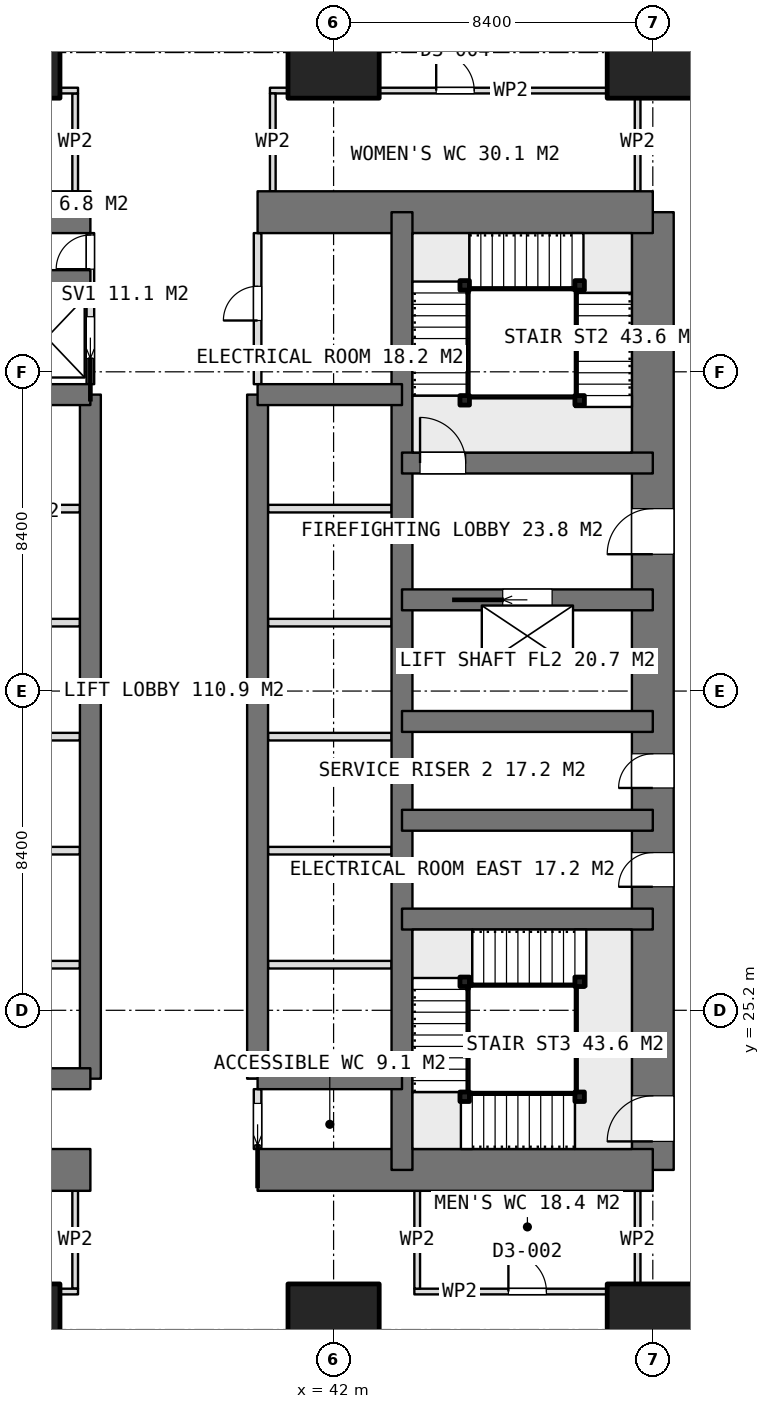
"""IFC4 building model, lengths in metres.
Left out: names, types, materials, properties, quantities, classifications, styles, units other than length and angle.
Written with IfcOpenShell. Run it as: python <this file> out.ifc"""

import sys

from ifc_helpers import new_model, si_unit, direction, frame, frame_2d, origin, origin_2d, place, context, subcontext, project, spatial, rectangle, extrude, element, fill, save


model = new_model("IFC4")
c1 = context("Model", 3, precision=1e-05, world=origin(), true_north=direction((0.0, 1.0)))
c2 = subcontext(c1, "Body", "Model", "MODEL_VIEW")
j1 = project(units=[si_unit("LENGTHUNIT", "METRE"), si_unit("PLANEANGLEUNIT", "RADIAN")], contexts=[c1])
p1 = place(None, origin())
s1 = spatial("IfcSite", under=j1, at=p1, CompositionType="ELEMENT")
p2 = place(p1, origin())
s2 = spatial("IfcBuilding", under=s1, at=p2, CompositionType="ELEMENT")
p3 = place(p2, frame((0.0, 0.0, -9.9)))
s3 = spatial("IfcBuildingStorey", under=s2, at=p3, CompositionType="ELEMENT", Elevation=-9.9)
p4 = place(p3, frame((25.2, 21.0, 0.0), z_axis=(0.0, 0.0, 1.0), x_axis=(1.0, 0.0, 0.0)))
e1 = element("IfcWall", 1, at=p4, inside=s3, PredefinedType="SHEAR", context=c2, shape_type="SweptSolid", body=[
    extrude(rectangle(XDim=10.4, YDim=1.1, at=frame_2d((5.2, 0.0))), origin(), (0.0, 0.0, 1.0), 4.5),
])
p5 = place(p3, frame((40.0, 21.0, 0.0), z_axis=(0.0, 0.0, 1.0), x_axis=(1.0, 0.0, 0.0)))
e2 = element("IfcWall", 2, at=p5, inside=s3, PredefinedType="SHEAR", context=c2, shape_type="SweptSolid", body=[
    extrude(rectangle(XDim=10.4, YDim=1.1, at=frame_2d((5.2, 0.0))), origin(), (0.0, 0.0, 1.0), 4.5),
])
p6 = place(p3, frame((25.2, 46.2, 0.0), z_axis=(0.0, 0.0, 1.0), x_axis=(1.0, 0.0, 0.0)))
e3 = element("IfcWall", 3, at=p6, inside=s3, PredefinedType="SHEAR", context=c2, shape_type="SweptSolid", body=[
    extrude(rectangle(XDim=10.4, YDim=1.1, at=frame_2d((5.2, 0.0))), origin(), (0.0, 0.0, 1.0), 4.5),
])
p7 = place(p3, frame((40.0, 46.2, 0.0), z_axis=(0.0, 0.0, 1.0), x_axis=(1.0, 0.0, 0.0)))
e4 = element("IfcWall", 4, at=p7, inside=s3, PredefinedType="SHEAR", context=c2, shape_type="SweptSolid", body=[
    extrude(rectangle(XDim=10.4, YDim=1.1, at=frame_2d((5.2, 0.0))), origin(), (0.0, 0.0, 1.0), 4.5),
])
p8 = place(p3, frame((50.4, 21.0, 0.0), z_axis=(0.0, 0.0, 1.0), x_axis=(0.0, 1.0, 0.0)))
e5 = element("IfcWall", 5, at=p8, inside=s3, PredefinedType="SHEAR", context=c2, shape_type="SweptSolid", body=[
    extrude(rectangle(XDim=25.2, YDim=1.1, at=frame_2d((12.6, 0.0))), origin(), (0.0, 0.0, 1.0), 4.5),
])
p9 = place(p8, frame((16.2, 0.0, 0.0)))
e6 = element("IfcOpeningElement", 6, at=p9, cuts=e5, PredefinedType="OPENING", context=c2, shape_type="SweptSolid", body=[
    extrude(rectangle(XDim=1.2, YDim=2.1, at=frame_2d((0.6, 1.05))), frame((0.0, 0.56, 0.0), z_axis=(0.0, -1.0, 0.0), x_axis=(1.0, 0.0, 0.0)), (0.0, 0.0, 1.0), 1.12),
])
p10 = place(p8, frame((10.05, 0.0, 0.0)))
e7 = element("IfcOpeningElement", 7, at=p10, cuts=e5, PredefinedType="OPENING", context=c2, shape_type="SweptSolid", body=[
    extrude(rectangle(XDim=0.9, YDim=2.1, at=frame_2d((0.45, 1.05))), frame((0.0, 0.56, 0.0), z_axis=(0.0, -1.0, 0.0), x_axis=(1.0, 0.0, 0.0)), (0.0, 0.0, 1.0), 1.12),
])
p11 = place(p8, frame((7.45, 0.0, 0.0)))
e8 = element("IfcOpeningElement", 8, at=p11, cuts=e5, PredefinedType="OPENING", context=c2, shape_type="SweptSolid", body=[
    extrude(rectangle(XDim=0.9, YDim=2.1, at=frame_2d((0.45, 1.05))), frame((0.0, 0.56, 0.0), z_axis=(0.0, -1.0, 0.0), x_axis=(1.0, 0.0, 0.0)), (0.0, 0.0, 1.0), 1.12),
])
p12 = place(p8, frame((0.75, 0.0, 0.0)))
e9 = element("IfcOpeningElement", 9, at=p12, cuts=e5, PredefinedType="OPENING", context=c2, shape_type="SweptSolid", body=[
    extrude(rectangle(XDim=1.2, YDim=2.1, at=frame_2d((0.6, 1.05))), frame((0.0, 0.56, 0.0), z_axis=(0.0, -1.0, 0.0), x_axis=(1.0, 0.0, 0.0)), (0.0, 0.0, 1.0), 1.12),
])
p13 = place(p3, frame((43.8, 21.0, 0.0), z_axis=(0.0, 0.0, 1.0), x_axis=(0.0, 1.0, 0.0)))
e10 = element("IfcWall", 10, at=p13, inside=s3, PredefinedType="SHEAR", context=c2, shape_type="SweptSolid", body=[
    extrude(rectangle(XDim=25.2, YDim=0.55, at=frame_2d((12.6, 0.0))), origin(), (0.0, 0.0, 1.0), 4.5),
])
for number, where, z_axis, x_axis in (
    (11, (35.6, 23.4, 0.0), (0.0, 0.0, 1.0), (0.0, 1.0, 0.0)),
    (12, (40.0, 23.4, 0.0), (0.0, 0.0, 1.0), (0.0, 1.0, 0.0)),
):
    element("IfcWall", number, at=place(p3, frame(where, z_axis=z_axis, x_axis=x_axis)), inside=s3, PredefinedType="SHEAR", context=c2, shape_type="SweptSolid", body=[
        extrude(rectangle(XDim=18.0, YDim=0.55, at=frame_2d((9.0, 0.0))), origin(), (0.0, 0.0, 1.0), 4.5),
    ])
for number, where, z_axis, x_axis in (
    (13, (31.8, 23.4, 0.0), (0.0, 0.0, 1.0), (1.0, 0.0, 0.0)),
    (14, (31.8, 41.4, 0.0), (0.0, 0.0, 1.0), (1.0, 0.0, 0.0)),
    (15, (31.8, 44.4, 0.0), (0.0, 0.0, 1.0), (1.0, 0.0, 0.0)),
    (16, (40.0, 23.4, 0.0), (0.0, 0.0, 1.0), (1.0, 0.0, 0.0)),
    (17, (40.0, 41.4, 0.0), (0.0, 0.0, 1.0), (1.0, 0.0, 0.0)),
):
    element("IfcWall", number, at=place(p3, frame(where, z_axis=z_axis, x_axis=x_axis)), inside=s3, PredefinedType="SHEAR", context=c2, shape_type="SweptSolid", body=[
        extrude(rectangle(XDim=3.8, YDim=0.55, at=frame_2d((1.9, 0.0))), origin(), (0.0, 0.0, 1.0), 4.5),
    ])
for number, where, z_axis, x_axis in (
    (18, (43.8, 27.6, 0.0), (0.0, 0.0, 1.0), (1.0, 0.0, 0.0)),
    (19, (43.8, 30.2, 0.0), (0.0, 0.0, 1.0), (1.0, 0.0, 0.0)),
    (20, (43.8, 32.8, 0.0), (0.0, 0.0, 1.0), (1.0, 0.0, 0.0)),
):
    element("IfcWall", number, at=place(p3, frame(where, z_axis=z_axis, x_axis=x_axis)), inside=s3, PredefinedType="SHEAR", context=c2, shape_type="SweptSolid", body=[
        extrude(rectangle(XDim=6.6, YDim=0.55, at=frame_2d((3.3, 0.0))), origin(), (0.0, 0.0, 1.0), 4.5),
    ])
p14 = place(p3, frame((43.8, 36.0, 0.0), z_axis=(0.0, 0.0, 1.0), x_axis=(1.0, 0.0, 0.0)))
e21 = element("IfcWall", 21, at=p14, inside=s3, PredefinedType="SHEAR", context=c2, shape_type="SweptSolid", body=[
    extrude(rectangle(XDim=6.6, YDim=0.55, at=frame_2d((3.3, 0.0))), origin(), (0.0, 0.0, 1.0), 4.5),
])
p15 = place(p14, frame((2.65, 0.0, 0.0)))
e22 = element("IfcOpeningElement", 22, at=p15, cuts=e21, PredefinedType="OPENING", context=c2, shape_type="SweptSolid", body=[
    extrude(rectangle(XDim=1.3, YDim=2.1, at=frame_2d((0.65, 1.05))), frame((0.0, 0.285, 0.0), z_axis=(0.0, -1.0, 0.0), x_axis=(1.0, 0.0, 0.0)), (0.0, 0.0, 1.0), 0.57),
])
p16 = place(p3, frame((43.8, 39.6, 0.0), z_axis=(0.0, 0.0, 1.0), x_axis=(1.0, 0.0, 0.0)))
e23 = element("IfcWall", 23, at=p16, inside=s3, PredefinedType="SHEAR", context=c2, shape_type="SweptSolid", body=[
    extrude(rectangle(XDim=6.6, YDim=0.55, at=frame_2d((3.3, 0.0))), origin(), (0.0, 0.0, 1.0), 4.5),
])
p17 = place(p16, frame((0.475, 0.0, 0.0)))
e24 = element("IfcOpeningElement", 24, at=p17, cuts=e23, PredefinedType="OPENING", context=c2, shape_type="SweptSolid", body=[
    extrude(rectangle(XDim=1.2, YDim=2.1, at=frame_2d((0.6, 1.05))), frame((0.0, 0.285, 0.0), z_axis=(0.0, -1.0, 0.0), x_axis=(1.0, 0.0, 0.0)), (0.0, 0.0, 1.0), 0.57),
])
for number, where, z_axis, x_axis in (
    (25, (33.6, 16.8, 0.0), (0.0, 0.0, 1.0), (1.0, 0.0, 0.0)),
    (26, (33.6, 50.4, 0.0), (0.0, 0.0, 1.0), (1.0, 0.0, 0.0)),
    (27, (42.0, 16.8, 0.0), (0.0, 0.0, 1.0), (1.0, 0.0, 0.0)),
    (28, (42.0, 50.4, 0.0), (0.0, 0.0, 1.0), (1.0, 0.0, 0.0)),
    (29, (50.4, 16.8, 0.0), (0.0, 0.0, 1.0), (1.0, 0.0, 0.0)),
    (30, (50.4, 50.4, 0.0), (0.0, 0.0, 1.0), (1.0, 0.0, 0.0)),
):
    element("IfcColumn", number, at=place(p3, frame(where, z_axis=z_axis, x_axis=x_axis)), inside=s3, PredefinedType="COLUMN", context=c2, shape_type="SweptSolid", body=[
        extrude(rectangle(XDim=2.4, YDim=2.4, at=origin_2d()), origin(), (0.0, 0.0, 1.0), 4.5),
    ])
for number, where, z_axis, x_axis in (
    (31, (32.075, 26.4, 0.0), (0.0, 0.0, 1.0), (1.0, 0.0, 0.0)),
    (32, (32.075, 29.4, 0.0), (0.0, 0.0, 1.0), (1.0, 0.0, 0.0)),
    (33, (32.075, 32.4, 0.0), (0.0, 0.0, 1.0), (1.0, 0.0, 0.0)),
    (34, (32.075, 35.4, 0.0), (0.0, 0.0, 1.0), (1.0, 0.0, 0.0)),
    (35, (32.075, 38.4, 0.0), (0.0, 0.0, 1.0), (1.0, 0.0, 0.0)),
    (36, (40.275, 26.4, 0.0), (0.0, 0.0, 1.0), (1.0, 0.0, 0.0)),
    (37, (40.275, 29.4, 0.0), (0.0, 0.0, 1.0), (1.0, 0.0, 0.0)),
    (38, (40.275, 32.4, 0.0), (0.0, 0.0, 1.0), (1.0, 0.0, 0.0)),
    (39, (40.275, 35.4, 0.0), (0.0, 0.0, 1.0), (1.0, 0.0, 0.0)),
    (40, (40.275, 38.4, 0.0), (0.0, 0.0, 1.0), (1.0, 0.0, 0.0)),
):
    element("IfcWall", number, at=place(p3, frame(where, z_axis=z_axis, x_axis=x_axis)), inside=s3, PredefinedType="PARTITIONING", context=c2, shape_type="SweptSolid", body=[
        extrude(rectangle(XDim=3.25, YDim=0.2, at=frame_2d((1.625, 0.0))), origin(), (0.0, 0.0, 1.0), 4.2),
    ])
p18 = place(p3, frame((40.0, 21.55, 0.0), z_axis=(0.0, 0.0, 1.0), x_axis=(0.0, 1.0, 0.0)))
e41 = element("IfcWall", 41, at=p18, inside=s3, PredefinedType="PARTITIONING", context=c2, shape_type="SweptSolid", body=[
    extrude(rectangle(XDim=1.575, YDim=0.2, at=frame_2d((0.788, 0.0))), origin(), (0.0, 0.0, 1.0), 4.2),
])
p19 = place(p18, frame((0.1, 0.0, 0.0)))
e42 = element("IfcOpeningElement", 42, at=p19, cuts=e41, PredefinedType="OPENING", context=c2, shape_type="SweptSolid", body=[
    extrude(rectangle(XDim=1.1, YDim=2.1, at=frame_2d((0.55, 1.05))), frame((0.0, 0.11, 0.0), z_axis=(0.0, -1.0, 0.0), x_axis=(1.0, 0.0, 0.0)), (0.0, 0.0, 1.0), 0.22),
])
p20 = place(p3, frame((40.0, 41.675, 0.0), z_axis=(0.0, 0.0, 1.0), x_axis=(0.0, 1.0, 0.0)))
e43 = element("IfcWall", 43, at=p20, inside=s3, PredefinedType="PARTITIONING", context=c2, shape_type="SweptSolid", body=[
    extrude(rectangle(XDim=3.975, YDim=0.2, at=frame_2d((1.987, 0.0))), origin(), (0.0, 0.0, 1.0), 4.2),
])
p21 = place(p20, frame((1.675, 0.0, 0.0)))
e44 = element("IfcOpeningElement", 44, at=p21, cuts=e43, PredefinedType="OPENING", context=c2, shape_type="SweptSolid", body=[
    extrude(rectangle(XDim=0.9, YDim=2.1, at=frame_2d((0.45, 1.05))), frame((0.0, 0.11, 0.0), z_axis=(0.0, -1.0, 0.0), x_axis=(1.0, 0.0, 0.0)), (0.0, 0.0, 1.0), 0.22),
])
p22 = place(p3, frame((35.6, 41.675, 0.0), z_axis=(0.0, 0.0, 1.0), x_axis=(0.0, 1.0, 0.0)))
e45 = element("IfcWall", 45, at=p22, inside=s3, PredefinedType="PARTITIONING", context=c2, shape_type="SweptSolid", body=[
    extrude(rectangle(XDim=3.975, YDim=0.2, at=frame_2d((1.987, 0.0))), origin(), (0.0, 0.0, 1.0), 4.2),
])
p23 = place(p22, frame((3.025, 0.0, 0.0)))
e46 = element("IfcOpeningElement", 46, at=p23, cuts=e45, PredefinedType="OPENING", context=c2, shape_type="SweptSolid", body=[
    extrude(rectangle(XDim=0.9, YDim=2.1, at=frame_2d((0.45, 1.05))), frame((0.0, 0.11, 0.0), z_axis=(0.0, -1.0, 0.0), x_axis=(1.0, 0.0, 0.0)), (0.0, 0.0, 1.0), 0.22),
])
p24 = place(p22, frame((0.675, 0.0, 0.0)))
e47 = element("IfcOpeningElement", 47, at=p24, cuts=e45, PredefinedType="OPENING", context=c2, shape_type="SweptSolid", body=[
    extrude(rectangle(XDim=1.1, YDim=2.1, at=frame_2d((0.55, 1.05))), frame((0.0, 0.11, 0.0), z_axis=(0.0, -1.0, 0.0), x_axis=(1.0, 0.0, 0.0)), (0.0, 0.0, 1.0), 0.22),
])
p25 = place(p3, frame((40.325, 49.4, 0.0), z_axis=(0.0, 0.0, 1.0), x_axis=(1.0, 0.0, 0.0)))
e48 = element("IfcWall", 48, at=p25, inside=s3, PredefinedType="PARTITIONING", context=c2, shape_type="SweptSolid", body=[
    extrude(rectangle(XDim=9.75, YDim=0.15, at=frame_2d((4.875, 0.0))), origin(), (0.0, 0.0, 1.0), 4.2),
])
p26 = place(p25, frame((4.375, 0.0, 0.0)))
e49 = element("IfcOpeningElement", 49, at=p26, cuts=e48, PredefinedType="OPENING", context=c2, shape_type="SweptSolid", body=[
    extrude(rectangle(XDim=1.0, YDim=2.1, at=frame_2d((0.5, 1.05))), frame((0.0, 0.085, 0.0), z_axis=(0.0, -1.0, 0.0), x_axis=(1.0, 0.0, 0.0)), (0.0, 0.0, 1.0), 0.17),
])
for number, where, z_axis, x_axis in (
    (50, (40.4, 46.75, 0.0), (0.0, 0.0, 1.0), (0.0, 1.0, 0.0)),
    (51, (50.0, 46.75, 0.0), (0.0, 0.0, 1.0), (0.0, 1.0, 0.0)),
):
    element("IfcWall", number, at=place(p3, frame(where, z_axis=z_axis, x_axis=x_axis)), inside=s3, PredefinedType="PARTITIONING", context=c2, shape_type="SweptSolid", body=[
        extrude(rectangle(XDim=2.575, YDim=0.15, at=frame_2d((1.288, 0.0))), origin(), (0.0, 0.0, 1.0), 4.2),
    ])
p27 = place(p3, frame((25.525, 49.4, 0.0), z_axis=(0.0, 0.0, 1.0), x_axis=(1.0, 0.0, 0.0)))
e52 = element("IfcWall", 52, at=p27, inside=s3, PredefinedType="PARTITIONING", context=c2, shape_type="SweptSolid", body=[
    extrude(rectangle(XDim=9.75, YDim=0.15, at=frame_2d((4.875, 0.0))), origin(), (0.0, 0.0, 1.0), 4.2),
])
p28 = place(p27, frame((4.375, 0.0, 0.0)))
e53 = element("IfcOpeningElement", 53, at=p28, cuts=e52, PredefinedType="OPENING", context=c2, shape_type="SweptSolid", body=[
    extrude(rectangle(XDim=1.0, YDim=2.1, at=frame_2d((0.5, 1.05))), frame((0.0, 0.085, 0.0), z_axis=(0.0, -1.0, 0.0), x_axis=(1.0, 0.0, 0.0)), (0.0, 0.0, 1.0), 0.17),
])
p29 = place(p3, frame((35.2, 46.75, 0.0), z_axis=(0.0, 0.0, 1.0), x_axis=(0.0, 1.0, 0.0)))
e54 = element("IfcWall", 54, at=p29, inside=s3, PredefinedType="PARTITIONING", context=c2, shape_type="SweptSolid", body=[
    extrude(rectangle(XDim=2.575, YDim=0.15, at=frame_2d((1.288, 0.0))), origin(), (0.0, 0.0, 1.0), 4.2),
])
p30 = place(p3, frame((25.525, 17.8, 0.0), z_axis=(0.0, 0.0, 1.0), x_axis=(1.0, 0.0, 0.0)))
e55 = element("IfcWall", 55, at=p30, inside=s3, PredefinedType="PARTITIONING", context=c2, shape_type="SweptSolid", body=[
    extrude(rectangle(XDim=9.75, YDim=0.15, at=frame_2d((4.875, 0.0))), origin(), (0.0, 0.0, 1.0), 4.2),
])
p31 = place(p30, frame((4.375, 0.0, 0.0)))
e56 = element("IfcOpeningElement", 56, at=p31, cuts=e55, PredefinedType="OPENING", context=c2, shape_type="SweptSolid", body=[
    extrude(rectangle(XDim=1.0, YDim=2.1, at=frame_2d((0.5, 1.05))), frame((0.0, 0.085, 0.0), z_axis=(0.0, -1.0, 0.0), x_axis=(1.0, 0.0, 0.0)), (0.0, 0.0, 1.0), 0.17),
])
p32 = place(p3, frame((35.2, 17.875, 0.0), z_axis=(0.0, 0.0, 1.0), x_axis=(0.0, 1.0, 0.0)))
e57 = element("IfcWall", 57, at=p32, inside=s3, PredefinedType="PARTITIONING", context=c2, shape_type="SweptSolid", body=[
    extrude(rectangle(XDim=2.575, YDim=0.15, at=frame_2d((1.288, 0.0))), origin(), (0.0, 0.0, 1.0), 4.2),
])
p33 = place(p3, frame((44.125, 17.8, 0.0), z_axis=(0.0, 0.0, 1.0), x_axis=(1.0, 0.0, 0.0)))
e58 = element("IfcWall", 58, at=p33, inside=s3, PredefinedType="PARTITIONING", context=c2, shape_type="SweptSolid", body=[
    extrude(rectangle(XDim=5.95, YDim=0.15, at=frame_2d((2.975, 0.0))), origin(), (0.0, 0.0, 1.0), 4.2),
])
p34 = place(p33, frame((2.475, 0.0, 0.0)))
e59 = element("IfcOpeningElement", 59, at=p34, cuts=e58, PredefinedType="OPENING", context=c2, shape_type="SweptSolid", body=[
    extrude(rectangle(XDim=1.0, YDim=2.1, at=frame_2d((0.5, 1.05))), frame((0.0, 0.085, 0.0), z_axis=(0.0, -1.0, 0.0), x_axis=(1.0, 0.0, 0.0)), (0.0, 0.0, 1.0), 0.17),
])
for number, where, z_axis, x_axis in (
    (60, (44.2, 17.875, 0.0), (0.0, 0.0, 1.0), (0.0, 1.0, 0.0)),
    (61, (50.0, 17.875, 0.0), (0.0, 0.0, 1.0), (0.0, 1.0, 0.0)),
):
    element("IfcWall", number, at=place(p3, frame(where, z_axis=z_axis, x_axis=x_axis)), inside=s3, PredefinedType="PARTITIONING", context=c2, shape_type="SweptSolid", body=[
        extrude(rectangle(XDim=2.575, YDim=0.15, at=frame_2d((1.288, 0.0))), origin(), (0.0, 0.0, 1.0), 4.2),
    ])
for number, where, z_axis, x_axis in (
    (62, (45.45, 41.25, 0.0), (0.0, 0.0, 1.0), (1.0, 0.0, 0.0)),
    (63, (45.45, 44.275, 0.0), (0.0, 0.0, 1.0), (1.0, 0.0, 0.0)),
    (64, (48.475, 44.275, 0.0), (0.0, 0.0, 1.0), (1.0, 0.0, 0.0)),
    (65, (48.475, 41.25, 0.0), (0.0, 0.0, 1.0), (1.0, 0.0, 0.0)),
    (66, (48.475, 22.925, 0.0), (0.0, 0.0, 1.0), (1.0, 0.0, 0.0)),
    (67, (45.45, 22.925, 0.0), (0.0, 0.0, 1.0), (1.0, 0.0, 0.0)),
    (68, (45.45, 25.95, 0.0), (0.0, 0.0, 1.0), (1.0, 0.0, 0.0)),
    (69, (48.475, 25.95, 0.0), (0.0, 0.0, 1.0), (1.0, 0.0, 0.0)),
):
    element("IfcColumn", number, at=place(p3, frame(where, z_axis=z_axis, x_axis=x_axis)), inside=s3, PredefinedType="COLUMN", context=c2, shape_type="SweptSolid", body=[
        extrude(rectangle(XDim=0.25, YDim=0.25, at=origin_2d()), origin(), (0.0, 0.0, 1.0), 4.5),
    ])
p35 = place(p9, origin())
e70 = element("IfcDoor", 70, at=p35, inside=s3, OperationType="SINGLE_SWING_LEFT", PredefinedType="DOOR", context=c2, shape_type="SweptSolid", body=[
    extrude(rectangle(XDim=1.2, YDim=2.1, at=frame_2d((0.6, 1.05))), frame((0.0, 0.025, 0.0), z_axis=(0.0, -1.0, 0.0), x_axis=(1.0, 0.0, 0.0)), (0.0, 0.0, 1.0), 0.05),
])
fill(e6, e70)
p36 = place(p10, origin())
e71 = element("IfcDoor", 71, at=p36, inside=s3, OperationType="SINGLE_SWING_LEFT", PredefinedType="DOOR", context=c2, shape_type="SweptSolid", body=[
    extrude(rectangle(XDim=0.9, YDim=2.1, at=frame_2d((0.45, 1.05))), frame((0.0, 0.025, 0.0), z_axis=(0.0, -1.0, 0.0), x_axis=(1.0, 0.0, 0.0)), (0.0, 0.0, 1.0), 0.05),
])
fill(e7, e71)
p37 = place(p11, origin())
e72 = element("IfcDoor", 72, at=p37, inside=s3, OperationType="SINGLE_SWING_LEFT", PredefinedType="DOOR", context=c2, shape_type="SweptSolid", body=[
    extrude(rectangle(XDim=0.9, YDim=2.1, at=frame_2d((0.45, 1.05))), frame((0.0, 0.025, 0.0), z_axis=(0.0, -1.0, 0.0), x_axis=(1.0, 0.0, 0.0)), (0.0, 0.0, 1.0), 0.05),
])
fill(e8, e72)
p38 = place(p19, origin())
e73 = element("IfcDoor", 73, at=p38, inside=s3, OperationType="SLIDING_TO_LEFT", PredefinedType="DOOR", context=c2, shape_type="SweptSolid", body=[
    extrude(rectangle(XDim=1.1, YDim=2.1, at=frame_2d((0.55, 1.05))), frame((0.0, 0.025, 0.0), z_axis=(0.0, -1.0, 0.0), x_axis=(1.0, 0.0, 0.0)), (0.0, 0.0, 1.0), 0.05),
])
fill(e42, e73)
p39 = place(p21, origin())
e74 = element("IfcDoor", 74, at=p39, inside=s3, OperationType="SINGLE_SWING_LEFT", PredefinedType="DOOR", context=c2, shape_type="SweptSolid", body=[
    extrude(rectangle(XDim=0.9, YDim=2.1, at=frame_2d((0.45, 1.05))), frame((0.0, 0.025, 0.0), z_axis=(0.0, -1.0, 0.0), x_axis=(1.0, 0.0, 0.0)), (0.0, 0.0, 1.0), 0.05),
])
fill(e44, e74)
p40 = place(p23, origin())
e75 = element("IfcDoor", 75, at=p40, inside=s3, OperationType="SINGLE_SWING_LEFT", PredefinedType="DOOR", context=c2, shape_type="SweptSolid", body=[
    extrude(rectangle(XDim=0.9, YDim=2.1, at=frame_2d((0.45, 1.05))), frame((0.0, 0.025, 0.0), z_axis=(0.0, -1.0, 0.0), x_axis=(1.0, 0.0, 0.0)), (0.0, 0.0, 1.0), 0.05),
])
fill(e46, e75)
p41 = place(p15, origin())
e76 = element("IfcDoor", 76, at=p41, inside=s3, OperationType="SLIDING_TO_LEFT", PredefinedType="USERDEFINED", context=c2, shape_type="SweptSolid", body=[
    extrude(rectangle(XDim=1.3, YDim=2.1, at=frame_2d((0.65, 1.05))), frame((0.0, 0.025, 0.0), z_axis=(0.0, -1.0, 0.0), x_axis=(1.0, 0.0, 0.0)), (0.0, 0.0, 1.0), 0.05),
])
fill(e22, e76)
p42 = place(p24, origin())
e77 = element("IfcDoor", 77, at=p42, inside=s3, OperationType="SLIDING_TO_LEFT", PredefinedType="USERDEFINED", context=c2, shape_type="SweptSolid", body=[
    extrude(rectangle(XDim=1.1, YDim=2.1, at=frame_2d((0.55, 1.05))), frame((0.0, 0.025, 0.0), z_axis=(0.0, -1.0, 0.0), x_axis=(1.0, 0.0, 0.0)), (0.0, 0.0, 1.0), 0.05),
])
fill(e47, e77)
p43 = place(p26, origin())
e78 = element("IfcDoor", 78, at=p43, inside=s3, OperationType="SINGLE_SWING_LEFT", PredefinedType="DOOR", context=c2, shape_type="SweptSolid", body=[
    extrude(rectangle(XDim=1.0, YDim=2.1, at=frame_2d((0.5, 1.05))), frame((0.0, 0.025, 0.0), z_axis=(0.0, -1.0, 0.0), x_axis=(1.0, 0.0, 0.0)), (0.0, 0.0, 1.0), 0.05),
])
fill(e49, e78)
p44 = place(p34, origin())
e79 = element("IfcDoor", 79, at=p44, inside=s3, OperationType="SINGLE_SWING_LEFT", PredefinedType="DOOR", context=c2, shape_type="SweptSolid", body=[
    extrude(rectangle(XDim=1.0, YDim=2.1, at=frame_2d((0.5, 1.05))), frame((0.0, 0.025, 0.0), z_axis=(0.0, -1.0, 0.0), x_axis=(1.0, 0.0, 0.0)), (0.0, 0.0, 1.0), 0.05),
])
fill(e59, e79)
p45 = place(p17, origin())
e80 = element("IfcDoor", 80, at=p45, inside=s3, OperationType="SINGLE_SWING_RIGHT", PredefinedType="DOOR", context=c2, shape_type="SweptSolid", body=[
    extrude(rectangle(XDim=1.2, YDim=2.1, at=frame_2d((0.6, 1.05))), frame((0.0, 0.025, 0.0), z_axis=(0.0, -1.0, 0.0), x_axis=(1.0, 0.0, 0.0)), (0.0, 0.0, 1.0), 0.05),
])
fill(e24, e80)
p46 = place(p12, origin())
e81 = element("IfcDoor", 81, at=p46, inside=s3, OperationType="SINGLE_SWING_RIGHT", PredefinedType="DOOR", context=c2, shape_type="SweptSolid", body=[
    extrude(rectangle(XDim=1.2, YDim=2.1, at=frame_2d((0.6, 1.05))), frame((0.0, 0.025, 0.0), z_axis=(0.0, -1.0, 0.0), x_axis=(1.0, 0.0, 0.0)), (0.0, 0.0, 1.0), 0.05),
])
fill(e9, e81)
save(model, sys.argv[1])
